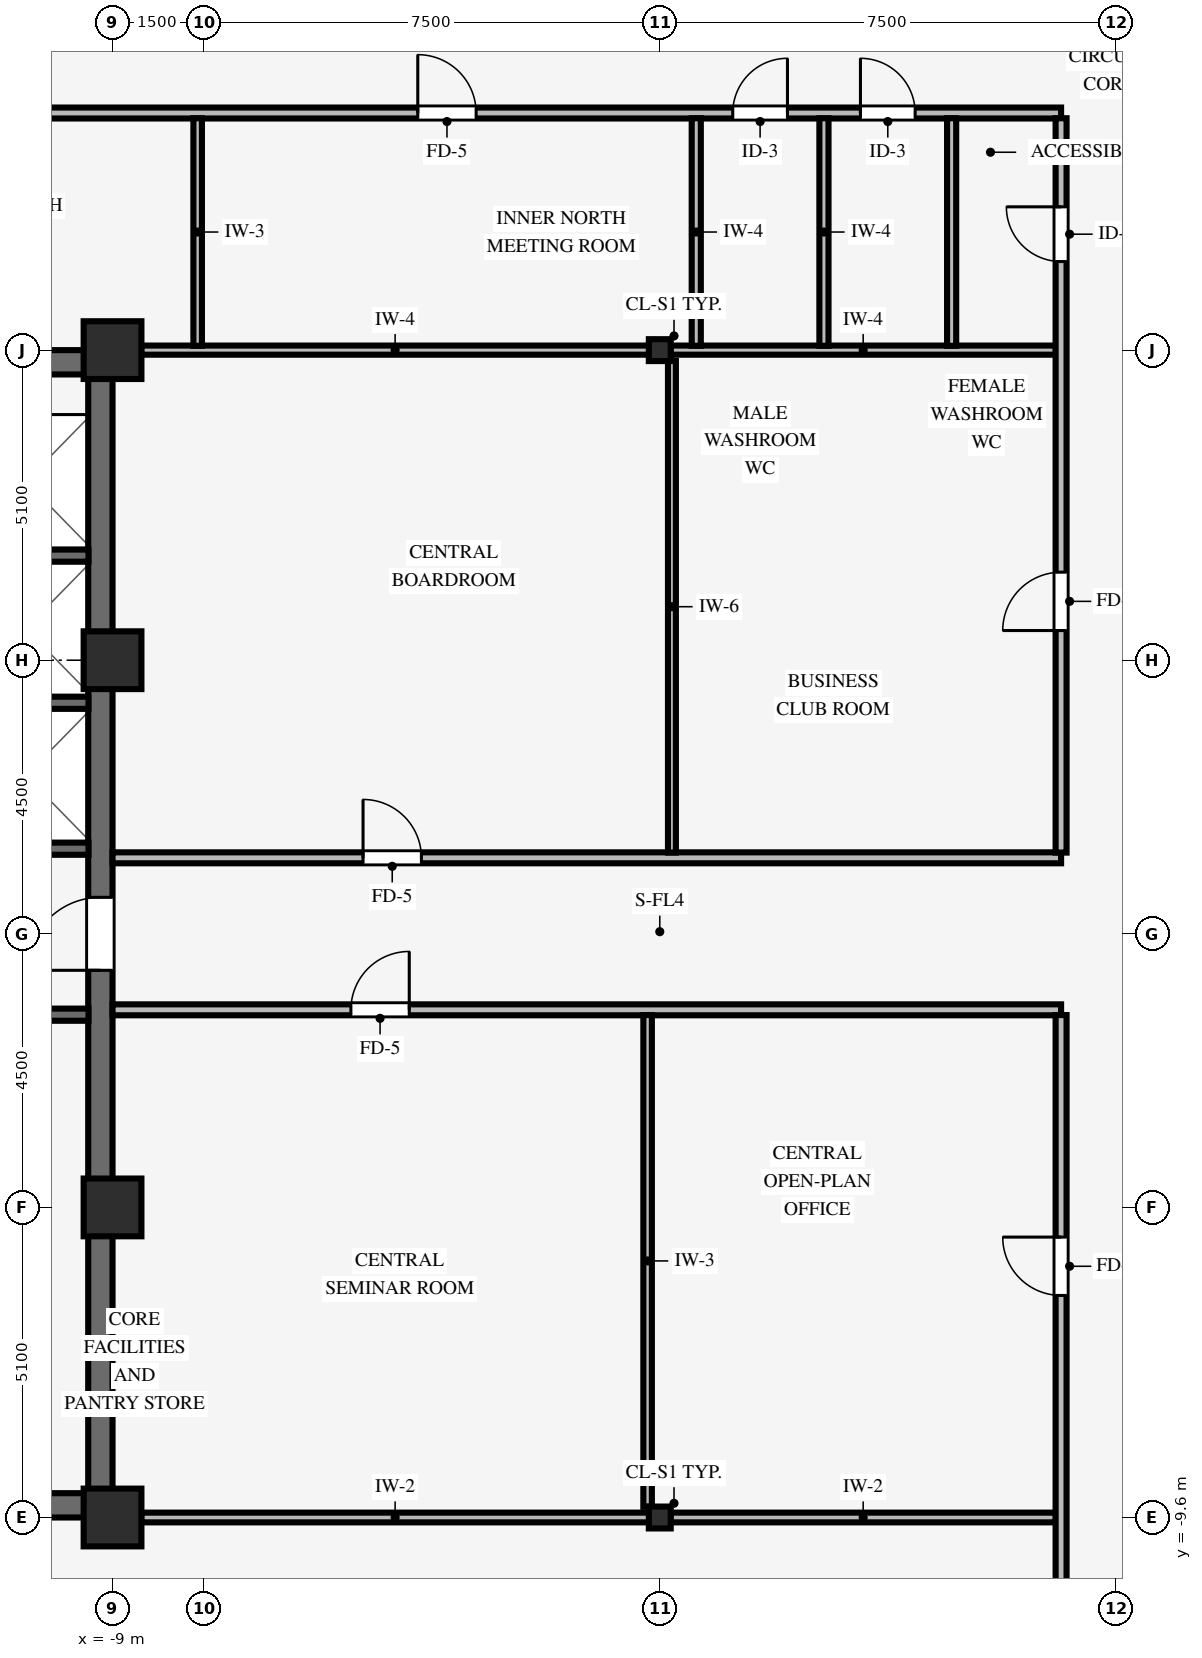
"""IFC4 building model, lengths in metres.
Left out: names, types, materials, properties, quantities, classifications, styles, units other than length and angle.
Written with IfcOpenShell. Run it as: python <this file> out.ifc"""

import sys

from ifc_helpers import new_model, si_unit, direction, frame, frame_2d, origin, origin_2d, place, context, subcontext, project, spatial, rectangle, i_section, extrude, source, transform, mapped, element, fill, save


model = new_model("IFC4")
c1 = context("Model", 3, precision=1e-05, world=origin(), true_north=direction((0.0, 1.0)))
c2 = subcontext(c1, "Body", "Model", "MODEL_VIEW")
j1 = project(units=[si_unit("LENGTHUNIT", "METRE"), si_unit("PLANEANGLEUNIT", "RADIAN")], contexts=[c1])
p1 = place(None, origin())
s1 = spatial("IfcSite", under=j1, at=p1, CompositionType="ELEMENT")
p2 = place(p1, origin())
s2 = spatial("IfcBuilding", under=s1, at=p2, CompositionType="ELEMENT")
p3 = place(p2, frame((0.0, 0.0, 138.45)))
s3 = spatial("IfcBuildingStorey", under=s2, at=p3, CompositionType="ELEMENT", Elevation=138.45)
for number, where, z_axis, x_axis in (
    (1, (-17.5, -9.4, 0.0), (0.0, 0.0, 1.0), (1.0, 0.0, 0.0)),
    (2, (-17.5, 9.4, 0.0), (0.0, 0.0, 1.0), (1.0, 0.0, 0.0)),
):
    element("IfcWall", number, at=place(p3, frame(where, z_axis=z_axis, x_axis=x_axis)), inside=s3, PredefinedType="SHEAR", context=c2, shape_type="SweptSolid", body=[
        extrude(rectangle(XDim=8.5, YDim=0.4, at=frame_2d((4.25, 0.0))), origin(), (0.0, 0.0, 1.0), 3.37),
    ])
p4 = place(p3, frame((-9.2, -9.205, 0.0), z_axis=(0.0, 0.0, 1.0), x_axis=(0.0, 1.0, 0.0)))
e3 = element("IfcWall", 3, at=p4, inside=s3, PredefinedType="SHEAR", context=c2, shape_type="SweptSolid", body=[
    extrude(rectangle(XDim=18.41, YDim=0.4, at=frame_2d((9.205, 0.0))), origin(), (0.0, 0.0, 1.0), 3.37),
])
p5 = place(p4, frame((8.605, 0.0, 0.0)))
e4 = element("IfcOpeningElement", 4, at=p5, cuts=e3, PredefinedType="OPENING", context=c2, shape_type="SweptSolid", body=[
    extrude(rectangle(XDim=1.2, YDim=2.15, at=frame_2d((0.6, 1.075))), frame((0.0, 0.21, 0.0), z_axis=(0.0, -1.0, 0.0), x_axis=(1.0, 0.0, 0.0)), (0.0, 0.0, 1.0), 0.42),
])
for number, where, z_axis, x_axis in (
    (5, (-9.0, -9.6, 0.0), (0.0, 0.0, 1.0), (1.0, 0.0, 0.0)),
    (6, (-9.0, -4.5, 0.0), (0.0, 0.0, 1.0), (1.0, 0.0, 0.0)),
    (7, (-9.0, 4.5, 0.0), (0.0, 0.0, 1.0), (1.0, 0.0, 0.0)),
    (8, (-9.0, 9.6, 0.0), (0.0, 0.0, 1.0), (1.0, 0.0, 0.0)),
):
    element("IfcColumn", number, at=place(p3, frame(where, z_axis=z_axis, x_axis=x_axis)), inside=s3, PredefinedType="COLUMN", context=c2, shape_type="SweptSolid", body=[
        extrude(rectangle(XDim=0.95, YDim=0.95, at=origin_2d()), origin(), (0.0, 0.0, 1.0), 3.37),
    ])
for number, where, z_axis, x_axis in (
    (9, (0.0, -9.6, 0.0), (0.0, 0.0, 1.0), (1.0, 0.0, 0.0)),
    (10, (0.0, 9.6, 0.0), (0.0, 0.0, 1.0), (1.0, 0.0, 0.0)),
):
    element("IfcColumn", number, at=place(p3, frame(where, z_axis=z_axis, x_axis=x_axis)), inside=s3, PredefinedType="COLUMN", context=c2, shape_type="SweptSolid", body=[
        extrude(i_section(OverallWidth=0.36, OverallDepth=0.36, WebThickness=0.021, FlangeThickness=0.021, FilletRadius=0.018, at=origin_2d()), origin(), (0.0, 0.0, 1.0), 3.37),
    ])
for number, where, z_axis, x_axis in (
    (11, (-11.505, -1.33, 0.0), (0.0, 0.0, 1.0), (1.0, 0.0, 0.0)),
    (12, (-11.505, 1.4, 0.0), (0.0, 0.0, 1.0), (1.0, 0.0, 0.0)),
    (13, (-11.505, 3.8, 0.0), (0.0, 0.0, 1.0), (1.0, 0.0, 0.0)),
    (14, (-11.505, 6.22, 0.0), (0.0, 0.0, 1.0), (1.0, 0.0, 0.0)),
):
    element("IfcWall", number, at=place(p3, frame(where, z_axis=z_axis, x_axis=x_axis)), inside=s3, PredefinedType="SHEAR", context=c2, shape_type="SweptSolid", body=[
        extrude(rectangle(XDim=2.11, YDim=0.2, at=frame_2d((1.055, 0.0))), origin(), (0.0, 0.0, 1.0), 3.37),
    ])
p6 = place(p3, frame((-8.529, -9.6, 0.0), z_axis=(0.0, 0.0, 1.0), x_axis=(1.0, 0.0, 0.0)))
e15 = element("IfcWall", 15, at=p6, inside=s3, PredefinedType="PARTITIONING", context=c2, shape_type="SweptSolid", body=[
    extrude(rectangle(XDim=8.353, YDim=0.16, at=frame_2d((4.177, 0.0))), origin(), (0.0, 0.0, 1.0), 2.405),
])
p7 = place(p3, frame((0.176, -9.6, 0.0), z_axis=(0.0, 0.0, 1.0), x_axis=(1.0, 0.0, 0.0)))
e16 = element("IfcWall", 16, at=p7, inside=s3, PredefinedType="PARTITIONING", context=c2, shape_type="SweptSolid", body=[
    extrude(rectangle(XDim=6.338, YDim=0.16, at=frame_2d((3.169, 0.0))), origin(), (0.0, 0.0, 1.0), 2.405),
])
p8 = place(p3, frame((-9.0, -1.25, 0.0), z_axis=(0.0, 0.0, 1.0), x_axis=(1.0, 0.0, 0.0)))
e17 = element("IfcWall", 17, at=p8, inside=s3, PredefinedType="PARTITIONING", context=c2, shape_type="SweptSolid", body=[
    extrude(rectangle(XDim=15.6, YDim=0.18, at=frame_2d((7.8, 0.0))), origin(), (0.0, 0.0, 1.0), 3.36),
])
p9 = place(p8, frame((3.92, 0.0, 0.0)))
e18 = element("IfcOpeningElement", 18, at=p9, cuts=e17, PredefinedType="OPENING", context=c2, shape_type="SweptSolid", body=[
    extrude(rectangle(XDim=0.96, YDim=2.1, at=frame_2d((0.48, 1.05))), frame((0.0, 0.1, 0.0), z_axis=(0.0, -1.0, 0.0), x_axis=(1.0, 0.0, 0.0)), (0.0, 0.0, 1.0), 0.2),
])
p10 = place(p3, frame((-9.0, 1.25, 0.0), z_axis=(0.0, 0.0, 1.0), x_axis=(1.0, 0.0, 0.0)))
e19 = element("IfcWall", 19, at=p10, inside=s3, PredefinedType="PARTITIONING", context=c2, shape_type="SweptSolid", body=[
    extrude(rectangle(XDim=15.6, YDim=0.18, at=frame_2d((7.8, 0.0))), origin(), (0.0, 0.0, 1.0), 3.36),
])
p11 = place(p10, frame((4.12, 0.0, 0.0)))
e20 = element("IfcOpeningElement", 20, at=p11, cuts=e19, PredefinedType="OPENING", context=c2, shape_type="SweptSolid", body=[
    extrude(rectangle(XDim=0.96, YDim=2.1, at=frame_2d((0.48, 1.05))), frame((0.0, 0.1, 0.0), z_axis=(0.0, -1.0, 0.0), x_axis=(1.0, 0.0, 0.0)), (0.0, 0.0, 1.0), 0.2),
])
p12 = place(p3, frame((-8.529, 9.6, 0.0), z_axis=(0.0, 0.0, 1.0), x_axis=(1.0, 0.0, 0.0)))
e21 = element("IfcWall", 21, at=p12, inside=s3, PredefinedType="PARTITIONING", context=c2, shape_type="SweptSolid", body=[
    extrude(rectangle(XDim=8.353, YDim=0.15, at=frame_2d((4.177, 0.0))), origin(), (0.0, 0.0, 1.0), 2.405),
])
p13 = place(p3, frame((0.176, 9.6, 0.0), z_axis=(0.0, 0.0, 1.0), x_axis=(1.0, 0.0, 0.0)))
e22 = element("IfcWall", 22, at=p13, inside=s3, PredefinedType="PARTITIONING", context=c2, shape_type="SweptSolid", body=[
    extrude(rectangle(XDim=6.338, YDim=0.15, at=frame_2d((3.169, 0.0))), origin(), (0.0, 0.0, 1.0), 2.405),
])
p14 = place(p3, frame((-17.7, 13.5, 0.0), z_axis=(0.0, 0.0, 1.0), x_axis=(1.0, 0.0, 0.0)))
e23 = element("IfcWall", 23, at=p14, inside=s3, PredefinedType="PARTITIONING", context=c2, shape_type="SweptSolid", body=[
    extrude(rectangle(XDim=24.3, YDim=0.18, at=frame_2d((12.15, 0.0))), origin(), (0.0, 0.0, 1.0), 2.998),
])
p15 = place(p14, frame((4.57, 0.0, 0.0)))
e24 = element("IfcOpeningElement", 24, at=p15, cuts=e23, PredefinedType="OPENING", context=c2, shape_type="SweptSolid", body=[
    extrude(rectangle(XDim=0.96, YDim=2.1, at=frame_2d((0.48, 1.05))), frame((0.0, 0.1, 0.0), z_axis=(0.0, -1.0, 0.0), x_axis=(1.0, 0.0, 0.0)), (0.0, 0.0, 1.0), 0.2),
])
p16 = place(p14, frame((13.72, 0.0, 0.0)))
e25 = element("IfcOpeningElement", 25, at=p16, cuts=e23, PredefinedType="OPENING", context=c2, shape_type="SweptSolid", body=[
    extrude(rectangle(XDim=0.96, YDim=2.1, at=frame_2d((0.48, 1.05))), frame((0.0, 0.1, 0.0), z_axis=(0.0, -1.0, 0.0), x_axis=(1.0, 0.0, 0.0)), (0.0, 0.0, 1.0), 0.2),
])
p17 = place(p14, frame((18.9, 0.0, 0.0)))
e26 = element("IfcOpeningElement", 26, at=p17, cuts=e23, PredefinedType="OPENING", context=c2, shape_type="SweptSolid", body=[
    extrude(rectangle(XDim=0.9, YDim=2.1, at=frame_2d((0.45, 1.05))), frame((0.0, 0.1, 0.0), z_axis=(0.0, -1.0, 0.0), x_axis=(1.0, 0.0, 0.0)), (0.0, 0.0, 1.0), 0.2),
])
p18 = place(p14, frame((21.0, 0.0, 0.0)))
e27 = element("IfcOpeningElement", 27, at=p18, cuts=e23, PredefinedType="OPENING", context=c2, shape_type="SweptSolid", body=[
    extrude(rectangle(XDim=0.9, YDim=2.1, at=frame_2d((0.45, 1.05))), frame((0.0, 0.1, 0.0), z_axis=(0.0, -1.0, 0.0), x_axis=(1.0, 0.0, 0.0)), (0.0, 0.0, 1.0), 0.2),
])
p19 = place(p3, frame((-7.6, 9.671, 0.0), z_axis=(0.0, 0.0, 1.0), x_axis=(0.0, 1.0, 0.0)))
e28 = element("IfcWall", 28, at=p19, inside=s3, PredefinedType="PARTITIONING", context=c2, shape_type="SweptSolid", body=[
    extrude(rectangle(XDim=3.743, YDim=0.14, at=frame_2d((1.872, 0.0))), origin(), (0.0, 0.0, 1.0), 3.36),
])
p20 = place(p3, frame((-0.2, -9.424, 0.0), z_axis=(0.0, 0.0, 1.0), x_axis=(0.0, 1.0, 0.0)))
e29 = element("IfcWall", 29, at=p20, inside=s3, PredefinedType="PARTITIONING", context=c2, shape_type="SweptSolid", body=[
    extrude(rectangle(XDim=8.088, YDim=0.14, at=frame_2d((4.044, 0.0))), origin(), (0.0, 0.0, 1.0), 2.816),
])
p21 = place(p3, frame((0.2, 1.336, 0.0), z_axis=(0.0, 0.0, 1.0), x_axis=(0.0, 1.0, 0.0)))
e30 = element("IfcWall", 30, at=p21, inside=s3, PredefinedType="PARTITIONING", context=c2, shape_type="SweptSolid", body=[
    extrude(rectangle(XDim=8.088, YDim=0.13, at=frame_2d((4.044, 0.0))), origin(), (0.0, 0.0, 1.0), 2.816),
])
for number, where, z_axis, x_axis in (
    (31, (0.6, 9.671, 0.0), (0.0, 0.0, 1.0), (0.0, 1.0, 0.0)),
    (32, (2.7, 9.671, 0.0), (0.0, 0.0, 1.0), (0.0, 1.0, 0.0)),
    (33, (4.8, 9.671, 0.0), (0.0, 0.0, 1.0), (0.0, 1.0, 0.0)),
):
    element("IfcWall", number, at=place(p3, frame(where, z_axis=z_axis, x_axis=x_axis)), inside=s3, PredefinedType="PARTITIONING", context=c2, shape_type="SweptSolid", body=[
        extrude(rectangle(XDim=3.743, YDim=0.15, at=frame_2d((1.872, 0.0))), origin(), (0.0, 0.0, 1.0), 3.36),
    ])
p22 = place(p3, frame((6.6, -13.414, 0.0), z_axis=(0.0, 0.0, 1.0), x_axis=(0.0, 1.0, 0.0)))
e34 = element("IfcWall", 34, at=p22, inside=s3, PredefinedType="PARTITIONING", context=c2, shape_type="SweptSolid", body=[
    extrude(rectangle(XDim=12.078, YDim=0.18, at=frame_2d((6.039, 0.0))), origin(), (0.0, 0.0, 1.0), 3.36),
])
p23 = place(p22, frame((7.466, 0.0, 0.0)))
e35 = element("IfcOpeningElement", 35, at=p23, cuts=e34, PredefinedType="OPENING", context=c2, shape_type="SweptSolid", body=[
    extrude(rectangle(XDim=0.96, YDim=2.1, at=frame_2d((0.48, 1.05))), frame((0.0, 0.1, 0.0), z_axis=(0.0, -1.0, 0.0), x_axis=(1.0, 0.0, 0.0)), (0.0, 0.0, 1.0), 0.2),
])
p24 = place(p3, frame((6.6, 1.336, 0.0), z_axis=(0.0, 0.0, 1.0), x_axis=(0.0, 1.0, 0.0)))
e36 = element("IfcWall", 36, at=p24, inside=s3, PredefinedType="PARTITIONING", context=c2, shape_type="SweptSolid", body=[
    extrude(rectangle(XDim=12.078, YDim=0.18, at=frame_2d((6.039, 0.0))), origin(), (0.0, 0.0, 1.0), 3.36),
])
p25 = place(p24, frame((3.652, 0.0, 0.0)))
e37 = element("IfcOpeningElement", 37, at=p25, cuts=e36, PredefinedType="OPENING", context=c2, shape_type="SweptSolid", body=[
    extrude(rectangle(XDim=0.96, YDim=2.1, at=frame_2d((0.48, 1.05))), frame((0.0, 0.1, 0.0), z_axis=(0.0, -1.0, 0.0), x_axis=(1.0, 0.0, 0.0)), (0.0, 0.0, 1.0), 0.2),
])
p26 = place(p24, frame((9.721, 0.0, 0.0)))
e38 = element("IfcOpeningElement", 38, at=p26, cuts=e36, PredefinedType="OPENING", context=c2, shape_type="SweptSolid", body=[
    extrude(rectangle(XDim=0.9, YDim=2.1, at=frame_2d((0.45, 1.05))), frame((0.0, 0.1, 0.0), z_axis=(0.0, -1.0, 0.0), x_axis=(1.0, 0.0, 0.0)), (0.0, 0.0, 1.0), 0.2),
])
m1 = source(origin(), c2, "Body", "SweptSolid", [
    extrude(rectangle(XDim=1.2, YDim=2.15, at=frame_2d((0.6, 1.075))), frame((0.0, 0.025, 0.0), z_axis=(0.0, -1.0, 0.0), x_axis=(1.0, 0.0, 0.0)), (0.0, 0.0, 1.0), 0.05),
])
p27 = place(p5, origin())
e39 = element("IfcDoor", 39, at=p27, inside=s3, OperationType="SINGLE_SWING_LEFT", PredefinedType="DOOR", context=c2, shape_type="MappedRepresentation", body=[
    mapped(m1, transform((0.0, 0.0, 0.0), scale=1.0)),
])
fill(e4, e39)
m2 = source(origin(), c2, "Body", "SweptSolid", [
    extrude(rectangle(XDim=0.96, YDim=2.1, at=frame_2d((0.48, 1.05))), frame((0.0, 0.025, 0.0), z_axis=(0.0, -1.0, 0.0), x_axis=(1.0, 0.0, 0.0)), (0.0, 0.0, 1.0), 0.05),
])
p28 = place(p11, origin())
e40 = element("IfcDoor", 40, at=p28, inside=s3, OperationType="SINGLE_SWING_LEFT", PredefinedType="DOOR", context=c2, shape_type="MappedRepresentation", body=[
    mapped(m2, transform((0.0, 0.0, 0.0), scale=1.0)),
])
fill(e20, e40)
p29 = place(p9, origin())
e41 = element("IfcDoor", 41, at=p29, inside=s3, OperationType="SINGLE_SWING_RIGHT", PredefinedType="DOOR", context=c2, shape_type="MappedRepresentation", body=[
    mapped(m2, transform((0.0, 0.0, 0.0), scale=1.0)),
])
fill(e18, e41)
p30 = place(p25, origin())
e42 = element("IfcDoor", 42, at=p30, inside=s3, OperationType="SINGLE_SWING_LEFT", PredefinedType="DOOR", context=c2, shape_type="MappedRepresentation", body=[
    mapped(m2, transform((0.0, 0.0, 0.0), scale=1.0)),
])
fill(e37, e42)
p31 = place(p23, origin())
e43 = element("IfcDoor", 43, at=p31, inside=s3, OperationType="SINGLE_SWING_RIGHT", PredefinedType="DOOR", context=c2, shape_type="MappedRepresentation", body=[
    mapped(m2, transform((0.0, 0.0, 0.0), scale=1.0)),
])
fill(e35, e43)
p32 = place(p16, origin())
e44 = element("IfcDoor", 44, at=p32, inside=s3, OperationType="SINGLE_SWING_LEFT", PredefinedType="DOOR", context=c2, shape_type="MappedRepresentation", body=[
    mapped(m2, transform((0.0, 0.0, 0.0), scale=1.0)),
])
fill(e25, e44)
m3 = source(origin(), c2, "Body", "SweptSolid", [
    extrude(rectangle(XDim=0.9, YDim=2.1, at=frame_2d((0.45, 1.05))), frame((0.0, 0.025, 0.0), z_axis=(0.0, -1.0, 0.0), x_axis=(1.0, 0.0, 0.0)), (0.0, 0.0, 1.0), 0.05),
])
p33 = place(p26, origin())
e45 = element("IfcDoor", 45, at=p33, inside=s3, OperationType="SINGLE_SWING_RIGHT", PredefinedType="DOOR", context=c2, shape_type="MappedRepresentation", body=[
    mapped(m3, transform((0.0, 0.0, 0.0), scale=1.0)),
])
fill(e38, e45)
p34 = place(p17, origin())
e46 = element("IfcDoor", 46, at=p34, inside=s3, OperationType="SINGLE_SWING_RIGHT", PredefinedType="DOOR", context=c2, shape_type="MappedRepresentation", body=[
    mapped(m3, transform((0.0, 0.0, 0.0), scale=1.0)),
])
fill(e26, e46)
p35 = place(p18, origin())
e47 = element("IfcDoor", 47, at=p35, inside=s3, OperationType="SINGLE_SWING_LEFT", PredefinedType="DOOR", context=c2, shape_type="MappedRepresentation", body=[
    mapped(m3, transform((0.0, 0.0, 0.0), scale=1.0)),
])
fill(e27, e47)
save(model, sys.argv[1])
